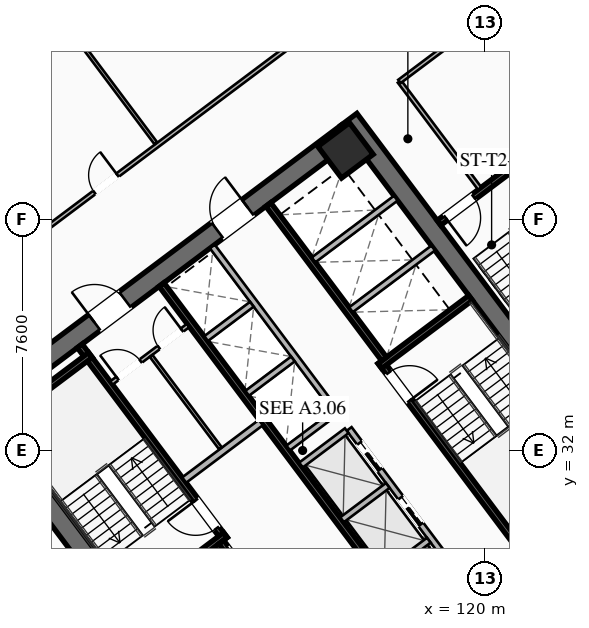
"""IFC4 building model, lengths in metres.
Left out: names, types, materials, properties, quantities, classifications, styles, units other than length and angle.
Written with IfcOpenShell. Run it as: python <this file> out.ifc"""

import sys

from ifc_helpers import new_model, si_unit, direction, frame, frame_2d, origin, origin_2d, place, context, subcontext, project, spatial, rectangle, hollow_rectangle, extrude, element, fill, save


model = new_model("IFC4")
c1 = context("Model", 3, precision=1e-05, world=origin(), true_north=direction((0.0, 1.0)))
c2 = subcontext(c1, "Body", "Model", "MODEL_VIEW")
j1 = project(units=[si_unit("LENGTHUNIT", "METRE"), si_unit("PLANEANGLEUNIT", "RADIAN")], contexts=[c1])
p1 = place(None, origin())
s1 = spatial("IfcSite", under=j1, at=p1, CompositionType="ELEMENT")
p2 = place(p1, origin())
s2 = spatial("IfcBuilding", under=s1, at=p2, CompositionType="ELEMENT")
p3 = place(p2, frame((0.0, 0.0, 81.4)))
s3 = spatial("IfcBuildingStorey", under=s2, at=p3, CompositionType="ELEMENT", Elevation=81.4)
for number, where, z_axis, x_axis in (
    (1, (112.476, 21.107, 0.0), (0.0, 0.0, 1.0), (-0.6, 0.8, 0.0)),
    (2, (115.524, 42.893, 0.0), (0.0, 0.0, 1.0), (0.6, -0.8, 0.0)),
):
    element("IfcWall", number, at=place(p3, frame(where, z_axis=z_axis, x_axis=x_axis)), inside=s3, PredefinedType="SHEAR", context=c2, shape_type="SweptSolid", body=[
        extrude(rectangle(XDim=15.6, YDim=0.65, at=frame_2d((7.8, 0.0))), origin(), (0.0, 0.0, 1.0), 3.55),
    ])
p4 = place(p3, frame((124.429, 30.478, 0.0), z_axis=(0.0, 0.0, 1.0), x_axis=(-0.799998028465, -0.600002628705, 0.0)))
e3 = element("IfcWall", 3, at=p4, inside=s3, PredefinedType="SHEAR", context=c2, shape_type="SweptSolid", body=[
    extrude(rectangle(XDim=14.86, YDim=0.65, at=frame_2d((7.43, 0.0))), origin(), (0.0, 0.0, 1.0), 3.55),
])
p5 = place(p4, frame((9.13, 0.0, 0.0)))
e4 = element("IfcOpeningElement", 4, at=p5, cuts=e3, PredefinedType="OPENING", context=c2, shape_type="SweptSolid", body=[
    extrude(rectangle(XDim=1.25, YDim=2.25, at=frame_2d((0.625, 1.125))), frame((0.0, 0.335, 0.0), z_axis=(0.0, -1.0, 0.0), x_axis=(1.0, 0.0, 0.0)), (0.0, 0.0, 1.0), 0.67),
])
p6 = place(p4, frame((4.08, 0.0, 0.0)))
e5 = element("IfcOpeningElement", 5, at=p6, cuts=e3, PredefinedType="OPENING", context=c2, shape_type="SweptSolid", body=[
    extrude(rectangle(XDim=1.25, YDim=2.25, at=frame_2d((0.625, 1.125))), frame((0.0, 0.335, 0.0), z_axis=(0.0, -1.0, 0.0), x_axis=(1.0, 0.0, 0.0)), (0.0, 0.0, 1.0), 0.67),
])
p7 = place(p3, frame((103.571, 33.522, 0.0), z_axis=(0.0, 0.0, 1.0), x_axis=(0.799998028465, 0.600002628705, 0.0)))
e6 = element("IfcWall", 6, at=p7, inside=s3, PredefinedType="SHEAR", context=c2, shape_type="SweptSolid", body=[
    extrude(rectangle(XDim=14.86, YDim=0.65, at=frame_2d((7.43, 0.0))), origin(), (0.0, 0.0, 1.0), 3.55),
])
p8 = place(p7, frame((4.48, 0.0, 0.0)))
e7 = element("IfcOpeningElement", 7, at=p8, cuts=e6, PredefinedType="OPENING", context=c2, shape_type="SweptSolid", body=[
    extrude(rectangle(XDim=1.25, YDim=2.25, at=frame_2d((0.625, 1.125))), frame((0.0, 0.335, 0.0), z_axis=(0.0, -1.0, 0.0), x_axis=(1.0, 0.0, 0.0)), (0.0, 0.0, 1.0), 0.67),
])
p9 = place(p7, frame((9.53, 0.0, 0.0)))
e8 = element("IfcOpeningElement", 8, at=p9, cuts=e6, PredefinedType="OPENING", context=c2, shape_type="SweptSolid", body=[
    extrude(rectangle(XDim=1.25, YDim=2.25, at=frame_2d((0.625, 1.125))), frame((0.0, 0.335, 0.0), z_axis=(0.0, -1.0, 0.0), x_axis=(1.0, 0.0, 0.0)), (0.0, 0.0, 1.0), 0.67),
])
p10 = place(p3, frame((115.41, 41.87, 0.0), z_axis=(0.0, 0.0, 1.0), x_axis=(0.799999996291, 0.600000004945, 0.0)))
e9 = element("IfcColumn", 9, at=p10, inside=s3, PredefinedType="COLUMN", context=c2, shape_type="SweptSolid", body=[
    extrude(hollow_rectangle(XDim=1.3, YDim=1.3, WallThickness=0.05, at=origin_2d()), origin(), (0.0, 0.0, 1.0), 3.35),
])
p11 = place(p3, frame((111.44, 29.08, 0.0), z_axis=(0.0, 0.0, 1.0), x_axis=(-0.600009827119, 0.799992629566, 0.0)))
e10 = element("IfcWall", 10, at=p11, inside=s3, PredefinedType="SHEAR", context=c2, shape_type="SweptSolid", body=[
    extrude(rectangle(XDim=7.95, YDim=0.2, at=frame_2d((3.975, 0.0))), origin(), (0.0, 0.0, 1.0), 3.35),
])
p12 = place(p11, frame((0.45, 0.0, 0.0)))
e11 = element("IfcOpeningElement", 11, at=p12, cuts=e10, PredefinedType="OPENING", context=c2, shape_type="SweptSolid", body=[
    extrude(rectangle(XDim=1.15, YDim=2.2, at=frame_2d((0.575, 1.1))), frame((0.0, 0.11, 0.0), z_axis=(0.0, -1.0, 0.0), x_axis=(1.0, 0.0, 0.0)), (0.0, 0.0, 1.0), 0.22),
])
for number, where, z_axis, x_axis in (
    (12, (108.476, 26.982, 0.0), (0.0, 0.0, 1.0), (0.8, 0.6, 0.0)),
    (13, (104.036, 32.902, 0.0), (0.0, 0.0, 1.0), (0.8, 0.6, 0.0)),
):
    element("IfcWall", number, at=place(p3, frame(where, z_axis=z_axis, x_axis=x_axis)), inside=s3, PredefinedType="SHEAR", context=c2, shape_type="SweptSolid", body=[
        extrude(rectangle(XDim=3.73, YDim=0.2, at=frame_2d((1.865, 0.0))), origin(), (0.0, 0.0, 1.0), 3.35),
    ])
p13 = place(p3, frame((116.56, 34.92, 0.0), z_axis=(0.0, 0.0, 1.0), x_axis=(0.600009827119, -0.799992629566, 0.0)))
e14 = element("IfcWall", 14, at=p13, inside=s3, PredefinedType="SHEAR", context=c2, shape_type="SweptSolid", body=[
    extrude(rectangle(XDim=7.95, YDim=0.2, at=frame_2d((3.975, 0.0))), origin(), (0.0, 0.0, 1.0), 3.35),
])
p14 = place(p13, frame((0.45, 0.0, 0.0)))
e15 = element("IfcOpeningElement", 15, at=p14, cuts=e14, PredefinedType="OPENING", context=c2, shape_type="SweptSolid", body=[
    extrude(rectangle(XDim=1.15, YDim=2.2, at=frame_2d((0.575, 1.1))), frame((0.0, 0.11, 0.0), z_axis=(0.0, -1.0, 0.0), x_axis=(1.0, 0.0, 0.0)), (0.0, 0.0, 1.0), 0.22),
])
p15 = place(p3, frame((116.54, 34.78, 0.0), z_axis=(0.0, 0.0, 1.0), x_axis=(0.799984290658, 0.600020945218, 0.0)))
e16 = element("IfcWall", 16, at=p15, inside=s3, PredefinedType="SHEAR", context=c2, shape_type="SweptSolid", body=[
    extrude(rectangle(XDim=3.73, YDim=0.2, at=frame_2d((1.865, 0.0))), origin(), (0.0, 0.0, 1.0), 3.35),
])
p16 = place(p3, frame((117.938, 26.016, 0.0), z_axis=(0.0, 0.0, 1.0), x_axis=(-0.600005463273, 0.799995902516, 0.0)))
e17 = element("IfcWall", 17, at=p16, inside=s3, PredefinedType="SHEAR", context=c2, shape_type="SweptSolid", body=[
    extrude(rectangle(XDim=14.3, YDim=0.2, at=frame_2d((7.15, 0.0))), origin(), (0.0, 0.0, 1.0), 3.35),
])
p17 = place(p3, frame((110.104, 31.028, 0.0), z_axis=(0.0, 0.0, 1.0), x_axis=(0.800018601094, 0.59997519774, 0.0)))
e18 = element("IfcWall", 18, at=p17, inside=s3, PredefinedType="SOLIDWALL", context=c2, shape_type="SweptSolid", body=[
    extrude(rectangle(XDim=3.15, YDim=0.22, at=frame_2d((1.575, 0.0))), origin(), (0.0, 0.0, 1.0), 2.703),
])
p18 = place(p3, frame((115.13, 23.91, 0.0), z_axis=(0.0, 0.0, 1.0), x_axis=(-0.599975393228, 0.800018454488, 0.0)))
e19 = element("IfcWall", 19, at=p18, inside=s3, PredefinedType="SHEAR", context=c2, shape_type="SweptSolid", body=[
    extrude(rectangle(XDim=6.35, YDim=0.2, at=frame_2d((3.175, 0.0))), origin(), (0.0, 0.0, 1.0), 3.35),
])
p19 = place(p18, frame((4.775, 0.0, 0.0)))
e20 = element("IfcOpeningElement", 20, at=p19, cuts=e19, PredefinedType="OPENING", context=c2, shape_type="SweptSolid", body=[
    extrude(rectangle(XDim=1.3, YDim=2.25, at=frame_2d((0.65, 1.125))), frame((0.0, 0.11, 0.0), z_axis=(0.0, -1.0, 0.0), x_axis=(1.0, 0.0, 0.0)), (0.0, 0.0, 1.0), 0.22),
])
p20 = place(p18, frame((2.775, 0.0, 0.0)))
e21 = element("IfcOpeningElement", 21, at=p20, cuts=e19, PredefinedType="OPENING", context=c2, shape_type="SweptSolid", body=[
    extrude(rectangle(XDim=1.3, YDim=2.25, at=frame_2d((0.65, 1.125))), frame((0.0, 0.11, 0.0), z_axis=(0.0, -1.0, 0.0), x_axis=(1.0, 0.0, 0.0)), (0.0, 0.0, 1.0), 0.22),
])
p21 = place(p18, frame((0.575, 0.0, 0.0)))
e22 = element("IfcOpeningElement", 22, at=p21, cuts=e19, PredefinedType="OPENING", context=c2, shape_type="SweptSolid", body=[
    extrude(rectangle(XDim=1.3, YDim=2.25, at=frame_2d((0.65, 1.125))), frame((0.0, 0.11, 0.0), z_axis=(0.0, -1.0, 0.0), x_axis=(1.0, 0.0, 0.0)), (0.0, 0.0, 1.0), 0.22),
])
p22 = place(p3, frame((112.87, 40.09, 0.0), z_axis=(0.0, 0.0, 1.0), x_axis=(0.599975393228, -0.800018454488, 0.0)))
e23 = element("IfcWall", 23, at=p22, inside=s3, PredefinedType="SHEAR", context=c2, shape_type="SweptSolid", body=[
    extrude(rectangle(XDim=6.35, YDim=0.2, at=frame_2d((3.175, 0.0))), origin(), (0.0, 0.0, 1.0), 3.35),
])
for number, where, z_axis, x_axis in (
    (24, (115.59, 36.63, 0.0), (0.0, 0.0, 1.0), (0.8, 0.6, 0.0)),
    (25, (114.36, 38.27, 0.0), (0.0, 0.0, 1.0), (0.8, 0.6, 0.0)),
):
    element("IfcWall", number, at=place(p3, frame(where, z_axis=z_axis, x_axis=x_axis)), inside=s3, PredefinedType="SOLIDWALL", context=c2, shape_type="SweptSolid", body=[
        extrude(rectangle(XDim=3.38, YDim=0.2, at=frame_2d((1.69, 0.0))), origin(), (0.0, 0.0, 1.0), 3.35),
    ])
p23 = place(p3, frame((107.71, 34.22, 0.0), z_axis=(0.0, 0.0, 1.0), x_axis=(0.799981399002, 0.60002480053, 0.0)))
e26 = element("IfcWall", 26, at=p23, inside=s3, PredefinedType="PARTITIONING", context=c2, shape_type="SweptSolid", body=[
    extrude(rectangle(XDim=3.15, YDim=0.135, at=frame_2d((1.575, 0.0))), origin(), (0.0, 0.0, 1.0), 2.703),
])
p24 = place(p23, frame((0.25, 0.0, 0.0)))
e27 = element("IfcOpeningElement", 27, at=p24, cuts=e26, PredefinedType="OPENING", context=c2, shape_type="SweptSolid", body=[
    extrude(rectangle(XDim=0.95, YDim=2.05, at=frame_2d((0.475, 1.025))), frame((0.0, 0.077, 0.0), z_axis=(0.0, -1.0, 0.0), x_axis=(1.0, 0.0, 0.0)), (0.0, 0.0, 1.0), 0.155),
])
p25 = place(p23, frame((1.95, 0.0, 0.0)))
e28 = element("IfcOpeningElement", 28, at=p25, cuts=e26, PredefinedType="OPENING", context=c2, shape_type="SweptSolid", body=[
    extrude(rectangle(XDim=0.95, YDim=2.05, at=frame_2d((0.475, 1.025))), frame((0.0, 0.077, 0.0), z_axis=(0.0, -1.0, 0.0), x_axis=(1.0, 0.0, 0.0)), (0.0, 0.0, 1.0), 0.155),
])
p26 = place(p3, frame((111.296, 32.072, 0.0), z_axis=(0.0, 0.0, 1.0), x_axis=(-0.59995887973, 0.800030838552, 0.0)))
e29 = element("IfcWall", 29, at=p26, inside=s3, PredefinedType="PARTITIONING", context=c2, shape_type="SweptSolid", body=[
    extrude(rectangle(XDim=3.8, YDim=0.11, at=frame_2d((1.9, 0.0))), origin(), (0.0, 0.0, 1.0), 2.703),
])
p27 = place(p3, frame((119.61, 27.27, 0.0), z_axis=(0.0, 0.0, 1.0), x_axis=(-0.600011488909, 0.79999138319, 0.0)))
e30 = element("IfcWall", 30, at=p27, inside=s3, PredefinedType="SOLIDWALL", context=c2, shape_type="SweptSolid", body=[
    extrude(rectangle(XDim=6.8, YDim=0.2, at=frame_2d((3.4, 0.0))), origin(), (0.0, 0.0, 1.0), 3.35),
])
p28 = place(p27, frame((0.625, 0.0, 0.0)))
e31 = element("IfcOpeningElement", 31, at=p28, cuts=e30, PredefinedType="OPENING", context=c2, shape_type="SweptSolid", body=[
    extrude(rectangle(XDim=1.1, YDim=2.2, at=frame_2d((0.55, 1.1))), frame((0.0, 0.11, 0.0), z_axis=(0.0, -1.0, 0.0), x_axis=(1.0, 0.0, 0.0)), (0.0, 0.0, 1.0), 0.22),
])
p29 = place(p27, frame((2.875, 0.0, 0.0)))
e32 = element("IfcOpeningElement", 32, at=p29, cuts=e30, PredefinedType="OPENING", context=c2, shape_type="SweptSolid", body=[
    extrude(rectangle(XDim=1.1, YDim=2.2, at=frame_2d((0.55, 1.1))), frame((0.0, 0.11, 0.0), z_axis=(0.0, -1.0, 0.0), x_axis=(1.0, 0.0, 0.0)), (0.0, 0.0, 1.0), 0.22),
])
p30 = place(p27, frame((5.125, 0.0, 0.0)))
e33 = element("IfcOpeningElement", 33, at=p30, cuts=e30, PredefinedType="OPENING", context=c2, shape_type="SweptSolid", body=[
    extrude(rectangle(XDim=1.1, YDim=2.2, at=frame_2d((0.55, 1.1))), frame((0.0, 0.11, 0.0), z_axis=(0.0, -1.0, 0.0), x_axis=(1.0, 0.0, 0.0)), (0.0, 0.0, 1.0), 0.22),
])
p31 = place(p3, frame((116.646, 27.922, 0.0), z_axis=(0.0, 0.0, 1.0), x_axis=(0.8, 0.6, 0.0)))
e34 = element("IfcWall", 34, at=p31, inside=s3, PredefinedType="SOLIDWALL", context=c2, shape_type="SweptSolid", body=[
    extrude(rectangle(XDim=1.88, YDim=0.2, at=frame_2d((0.94, 0.0))), origin(), (0.0, 0.0, 1.0), 3.35),
])
p32 = place(p3, frame((115.296, 29.722, 0.0), z_axis=(0.0, 0.0, 1.0), x_axis=(0.799984418148, 0.600020775241, 0.0)))
e35 = element("IfcWall", 35, at=p32, inside=s3, PredefinedType="SOLIDWALL", context=c2, shape_type="SweptSolid", body=[
    extrude(rectangle(XDim=1.88, YDim=0.2, at=frame_2d((0.94, 0.0))), origin(), (0.0, 0.0, 1.0), 3.35),
])
p33 = place(p3, frame((113.946, 31.522, 0.0), z_axis=(0.0, 0.0, 1.0), x_axis=(0.8, 0.6, 0.0)))
e36 = element("IfcWall", 36, at=p33, inside=s3, PredefinedType="SOLIDWALL", context=c2, shape_type="SweptSolid", body=[
    extrude(rectangle(XDim=1.88, YDim=0.2, at=frame_2d((0.94, 0.0))), origin(), (0.0, 0.0, 1.0), 3.35),
])
p34 = place(p3, frame((115.11, 33.27, 0.0), z_axis=(0.0, 0.0, 1.0), x_axis=(-0.600011488909, 0.79999138319, 0.0)))
e37 = element("IfcWall", 37, at=p34, inside=s3, PredefinedType="SOLIDWALL", context=c2, shape_type="SweptSolid", body=[
    extrude(rectangle(XDim=6.8, YDim=0.2, at=frame_2d((3.4, 0.0))), origin(), (0.0, 0.0, 1.0), 3.35),
])
p35 = place(p3, frame((113.526, 32.082, 0.0), z_axis=(0.0, 0.0, 1.0), x_axis=(0.800046745961, 0.599937666993, 0.0)))
e38 = element("IfcWall", 38, at=p35, inside=s3, PredefinedType="SOLIDWALL", context=c2, shape_type="SweptSolid", body=[
    extrude(rectangle(XDim=1.88, YDim=0.2, at=frame_2d((0.94, 0.0))), origin(), (0.0, 0.0, 1.0), 3.35),
])
p36 = place(p3, frame((112.176, 33.882, 0.0), z_axis=(0.0, 0.0, 1.0), x_axis=(0.8, 0.6, 0.0)))
e39 = element("IfcWall", 39, at=p36, inside=s3, PredefinedType="SOLIDWALL", context=c2, shape_type="SweptSolid", body=[
    extrude(rectangle(XDim=1.88, YDim=0.2, at=frame_2d((0.94, 0.0))), origin(), (0.0, 0.0, 1.0), 3.35),
])
p37 = place(p3, frame((110.826, 35.682, 0.0), z_axis=(0.0, 0.0, 1.0), x_axis=(0.799984418148, 0.600020775241, 0.0)))
e40 = element("IfcWall", 40, at=p37, inside=s3, PredefinedType="SOLIDWALL", context=c2, shape_type="SweptSolid", body=[
    extrude(rectangle(XDim=1.88, YDim=0.2, at=frame_2d((0.94, 0.0))), origin(), (0.0, 0.0, 1.0), 3.35),
])
p38 = place(p3, frame((121.204, 41.528, 0.0), z_axis=(0.0, 0.0, 1.0), x_axis=(-0.800017232136, -0.599977023131, 0.0)))
e41 = element("IfcWall", 41, at=p38, inside=s3, PredefinedType="SHEAR", context=c2, shape_type="SweptSolid", body=[
    extrude(rectangle(XDim=3.4, YDim=0.2, at=frame_2d((1.7, 0.0))), origin(), (0.0, 0.0, 1.0), 3.35),
])
p39 = place(p38, frame((1.975, 0.0, 0.0)))
e42 = element("IfcOpeningElement", 42, at=p39, cuts=e41, PredefinedType="OPENING", context=c2, shape_type="SweptSolid", body=[
    extrude(rectangle(XDim=1.15, YDim=2.2, at=frame_2d((0.575, 1.1))), frame((0.0, 0.11, 0.0), z_axis=(0.0, -1.0, 0.0), x_axis=(1.0, 0.0, 0.0)), (0.0, 0.0, 1.0), 0.22),
])
p40 = place(p3, frame((119.824, 40.618, 0.0), z_axis=(0.0, 0.0, 1.0), x_axis=(-0.599982243973, 0.800013316712, 0.0)))
e43 = element("IfcWall", 43, at=p40, inside=s3, PredefinedType="PARTITIONING", context=c2, shape_type="SweptSolid", body=[
    extrude(rectangle(XDim=4.4, YDim=0.135, at=frame_2d((2.2, 0.0))), origin(), (0.0, 0.0, 1.0), 2.703),
])
p41 = place(p3, frame((98.516, 34.012, 0.0), z_axis=(0.0, 0.0, 1.0), x_axis=(0.8, 0.6, 0.0)))
e44 = element("IfcWall", 44, at=p41, inside=s3, PredefinedType="PARTITIONING", context=c2, shape_type="SweptSolid", body=[
    extrude(rectangle(XDim=28.23, YDim=0.135, at=frame_2d((14.115, 0.0))), origin(), (0.0, 0.0, 1.0), 2.703),
])
p42 = place(p41, frame((0.3, 0.0, 0.0)))
e45 = element("IfcOpeningElement", 45, at=p42, cuts=e44, PredefinedType="OPENING", context=c2, shape_type="SweptSolid", body=[
    extrude(rectangle(XDim=0.95, YDim=2.05, at=frame_2d((0.475, 1.025))), frame((0.0, 0.077, 0.0), z_axis=(0.0, -1.0, 0.0), x_axis=(1.0, 0.0, 0.0)), (0.0, 0.0, 1.0), 0.155),
])
p43 = place(p41, frame((10.792, 0.0, 0.0)))
e46 = element("IfcOpeningElement", 46, at=p43, cuts=e44, PredefinedType="OPENING", context=c2, shape_type="SweptSolid", body=[
    extrude(rectangle(XDim=0.95, YDim=2.05, at=frame_2d((0.475, 1.025))), frame((0.0, 0.077, 0.0), z_axis=(0.0, -1.0, 0.0), x_axis=(1.0, 0.0, 0.0)), (0.0, 0.0, 1.0), 0.155),
])
p44 = place(p41, frame((26.98, 0.0, 0.0)))
e47 = element("IfcOpeningElement", 47, at=p44, cuts=e44, PredefinedType="OPENING", context=c2, shape_type="SweptSolid", body=[
    extrude(rectangle(XDim=0.95, YDim=2.05, at=frame_2d((0.475, 1.025))), frame((0.0, 0.077, 0.0), z_axis=(0.0, -1.0, 0.0), x_axis=(1.0, 0.0, 0.0)), (0.0, 0.0, 1.0), 0.155),
])
p45 = place(p3, frame((109.172, 42.104, 0.0), z_axis=(0.0, 0.0, 1.0), x_axis=(-0.6, 0.8, 0.0)))
e48 = element("IfcWall", 48, at=p45, inside=s3, PredefinedType="PARTITIONING", context=c2, shape_type="SweptSolid", body=[
    extrude(rectangle(XDim=8.9, YDim=0.11, at=frame_2d((4.45, 0.0))), origin(), (0.0, 0.0, 1.0), 2.703),
])
p46 = place(p3, frame((134.402, 33.214, 0.0), z_axis=(0.0, 0.0, 1.0), x_axis=(-0.799995848831, -0.600005534853, 0.0)))
e49 = element("IfcWall", 49, at=p46, inside=s3, PredefinedType="PARTITIONING", context=c2, shape_type="SweptSolid", body=[
    extrude(rectangle(XDim=28.23, YDim=0.135, at=frame_2d((14.115, 0.0))), origin(), (0.0, 0.0, 1.0), 2.703),
])
p47 = place(p46, frame((26.9, 0.0, 0.0)))
e50 = element("IfcOpeningElement", 50, at=p47, cuts=e49, PredefinedType="OPENING", context=c2, shape_type="SweptSolid", body=[
    extrude(rectangle(XDim=0.95, YDim=2.05, at=frame_2d((0.475, 1.025))), frame((0.0, 0.077, 0.0), z_axis=(0.0, -1.0, 0.0), x_axis=(1.0, 0.0, 0.0)), (0.0, 0.0, 1.0), 0.155),
])
p48 = place(p46, frame((0.38, 0.0, 0.0)))
e51 = element("IfcOpeningElement", 51, at=p48, cuts=e49, PredefinedType="OPENING", context=c2, shape_type="SweptSolid", body=[
    extrude(rectangle(XDim=0.95, YDim=2.05, at=frame_2d((0.475, 1.025))), frame((0.0, 0.077, 0.0), z_axis=(0.0, -1.0, 0.0), x_axis=(1.0, 0.0, 0.0)), (0.0, 0.0, 1.0), 0.155),
])
p49 = place(p3, frame((125.224, 50.168, 0.0), z_axis=(0.0, 0.0, 1.0), x_axis=(-0.8, -0.6, 0.0)))
e52 = element("IfcWall", 52, at=p49, inside=s3, PredefinedType="PARTITIONING", context=c2, shape_type="SweptSolid", body=[
    extrude(rectangle(XDim=10.05, YDim=0.135, at=frame_2d((5.025, 0.0))), origin(), (0.0, 0.0, 1.0), 2.703),
])
p50 = place(p49, frame((4.9, 0.0, 0.0)))
e53 = element("IfcOpeningElement", 53, at=p50, cuts=e52, PredefinedType="OPENING", context=c2, shape_type="SweptSolid", body=[
    extrude(rectangle(XDim=0.95, YDim=2.05, at=frame_2d((0.475, 1.025))), frame((0.0, 0.077, 0.0), z_axis=(0.0, -1.0, 0.0), x_axis=(1.0, 0.0, 0.0)), (0.0, 0.0, 1.0), 0.155),
])
p51 = place(p3, frame((111.77, 16.34, 0.0), z_axis=(0.0, 0.0, 1.0), x_axis=(-0.600003549523, 0.799997337845, 0.0)))
e54 = element("IfcWall", 54, at=p51, inside=s3, PredefinedType="PARTITIONING", context=c2, shape_type="SweptSolid", body=[
    extrude(rectangle(XDim=22.01, YDim=0.135, at=frame_2d((11.005, 0.0))), origin(), (0.0, 0.0, 1.0), 2.703),
])
p52 = place(p51, frame((0.3, 0.0, 0.0)))
e55 = element("IfcOpeningElement", 55, at=p52, cuts=e54, PredefinedType="OPENING", context=c2, shape_type="SweptSolid", body=[
    extrude(rectangle(XDim=0.95, YDim=2.05, at=frame_2d((0.475, 1.025))), frame((0.0, 0.077, 0.0), z_axis=(0.0, -1.0, 0.0), x_axis=(1.0, 0.0, 0.0)), (0.0, 0.0, 1.0), 0.155),
])
p53 = place(p8, origin())
e56 = element("IfcDoor", 56, at=p53, inside=s3, OperationType="SINGLE_SWING_LEFT", PredefinedType="DOOR", context=c2, shape_type="SweptSolid", body=[
    extrude(rectangle(XDim=1.25, YDim=2.25, at=frame_2d((0.625, 1.125))), frame((0.0, 0.025, 0.0), z_axis=(0.0, -1.0, 0.0), x_axis=(1.0, 0.0, 0.0)), (0.0, 0.0, 1.0), 0.05),
])
fill(e7, e56)
p54 = place(p9, origin())
e57 = element("IfcDoor", 57, at=p54, inside=s3, OperationType="SINGLE_SWING_RIGHT", PredefinedType="DOOR", context=c2, shape_type="SweptSolid", body=[
    extrude(rectangle(XDim=1.25, YDim=2.25, at=frame_2d((0.625, 1.125))), frame((0.0, 0.025, 0.0), z_axis=(0.0, -1.0, 0.0), x_axis=(1.0, 0.0, 0.0)), (0.0, 0.0, 1.0), 0.05),
])
fill(e8, e57)
p55 = place(p12, origin())
e58 = element("IfcDoor", 58, at=p55, inside=s3, OperationType="SINGLE_SWING_RIGHT", PredefinedType="DOOR", context=c2, shape_type="SweptSolid", body=[
    extrude(rectangle(XDim=1.15, YDim=2.2, at=frame_2d((0.575, 1.1))), frame((0.0, 0.025, 0.0), z_axis=(0.0, -1.0, 0.0), x_axis=(1.0, 0.0, 0.0)), (0.0, 0.0, 1.0), 0.05),
])
fill(e11, e58)
p56 = place(p14, origin())
e59 = element("IfcDoor", 59, at=p56, inside=s3, OperationType="SINGLE_SWING_RIGHT", PredefinedType="DOOR", context=c2, shape_type="SweptSolid", body=[
    extrude(rectangle(XDim=1.15, YDim=2.2, at=frame_2d((0.575, 1.1))), frame((0.0, 0.025, 0.0), z_axis=(0.0, -1.0, 0.0), x_axis=(1.0, 0.0, 0.0)), (0.0, 0.0, 1.0), 0.05),
])
fill(e15, e59)
p57 = place(p24, origin())
e60 = element("IfcDoor", 60, at=p57, inside=s3, OperationType="SINGLE_SWING_LEFT", PredefinedType="DOOR", context=c2, shape_type="SweptSolid", body=[
    extrude(rectangle(XDim=0.95, YDim=2.05, at=frame_2d((0.475, 1.025))), frame((0.0, 0.025, 0.0), z_axis=(0.0, -1.0, 0.0), x_axis=(1.0, 0.0, 0.0)), (0.0, 0.0, 1.0), 0.05),
])
fill(e27, e60)
p58 = place(p25, origin())
e61 = element("IfcDoor", 61, at=p58, inside=s3, OperationType="SINGLE_SWING_RIGHT", PredefinedType="DOOR", context=c2, shape_type="SweptSolid", body=[
    extrude(rectangle(XDim=0.95, YDim=2.05, at=frame_2d((0.475, 1.025))), frame((0.0, 0.025, 0.0), z_axis=(0.0, -1.0, 0.0), x_axis=(1.0, 0.0, 0.0)), (0.0, 0.0, 1.0), 0.05),
])
fill(e28, e61)
p59 = place(p39, origin())
e62 = element("IfcDoor", 62, at=p59, inside=s3, OperationType="SINGLE_SWING_RIGHT", PredefinedType="DOOR", context=c2, shape_type="SweptSolid", body=[
    extrude(rectangle(XDim=1.15, YDim=2.2, at=frame_2d((0.575, 1.1))), frame((0.0, 0.025, 0.0), z_axis=(0.0, -1.0, 0.0), x_axis=(1.0, 0.0, 0.0)), (0.0, 0.0, 1.0), 0.05),
])
fill(e42, e62)
p60 = place(p43, origin())
e63 = element("IfcDoor", 63, at=p60, inside=s3, OperationType="SINGLE_SWING_RIGHT", PredefinedType="DOOR", context=c2, shape_type="SweptSolid", body=[
    extrude(rectangle(XDim=0.95, YDim=2.05, at=frame_2d((0.475, 1.025))), frame((0.0, 0.025, 0.0), z_axis=(0.0, -1.0, 0.0), x_axis=(1.0, 0.0, 0.0)), (0.0, 0.0, 1.0), 0.05),
])
fill(e46, e63)
p61 = place(p29, origin())
e64 = element("IfcDoor", 64, at=p61, inside=s3, OperationType="SLIDING_TO_LEFT", PredefinedType="DOOR", context=c2, shape_type="SweptSolid", body=[
    extrude(rectangle(XDim=1.1, YDim=2.2, at=frame_2d((0.55, 1.1))), frame((0.0, 0.025, 0.0), z_axis=(0.0, -1.0, 0.0), x_axis=(1.0, 0.0, 0.0)), (0.0, 0.0, 1.0), 0.05),
])
fill(e32, e64)
p62 = place(p30, origin())
e65 = element("IfcDoor", 65, at=p62, inside=s3, OperationType="SLIDING_TO_LEFT", PredefinedType="DOOR", context=c2, shape_type="SweptSolid", body=[
    extrude(rectangle(XDim=1.1, YDim=2.2, at=frame_2d((0.55, 1.1))), frame((0.0, 0.025, 0.0), z_axis=(0.0, -1.0, 0.0), x_axis=(1.0, 0.0, 0.0)), (0.0, 0.0, 1.0), 0.05),
])
fill(e33, e65)
save(model, sys.argv[1])
